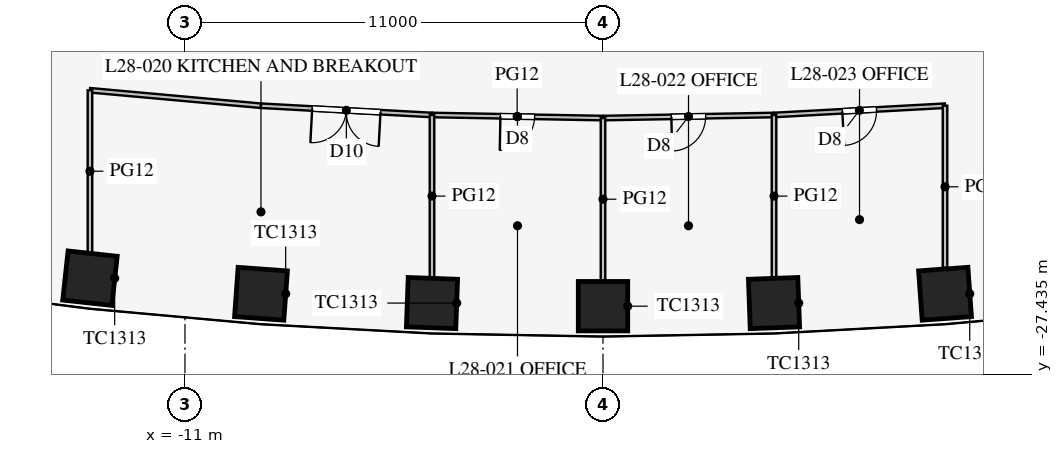
"""IFC4 building model, lengths in metres.
Left out: names, types, materials, properties, quantities, classifications, styles, units other than length and angle.
Written with IfcOpenShell. Run it as: python <this file> out.ifc"""

import sys

from ifc_helpers import new_model, si_unit, direction, frame, frame_2d, origin, origin_2d, place, context, subcontext, project, spatial, rectangle, extrude, element, fill, save


model = new_model("IFC4")
c1 = context("Model", 3, precision=1e-05, world=origin(), true_north=direction((0.0, 1.0)))
c2 = subcontext(c1, "Body", "Model", "MODEL_VIEW")
j1 = project(units=[si_unit("LENGTHUNIT", "METRE"), si_unit("PLANEANGLEUNIT", "RADIAN")], contexts=[c1])
p1 = place(None, origin())
s1 = spatial("IfcSite", under=j1, at=p1, CompositionType="ELEMENT")
p2 = place(p1, origin())
s2 = spatial("IfcBuilding", under=s1, at=p2, CompositionType="ELEMENT")
p3 = place(p2, frame((0.0, 0.0, 124.1)))
s3 = spatial("IfcBuildingStorey", under=s2, at=p3, CompositionType="ELEMENT", Elevation=124.1)
for number, where, z_axis, x_axis in (
    (1, (-13.5, -24.913, 0.0), (0.0, 0.0, 1.0), (0.994, -0.108, 0.0)),
    (2, (-9.0, -25.323, 0.0), (0.0, 0.0, 1.0), (0.997, -0.072, 0.0)),
    (3, (-4.5, -25.568, 0.0), (0.0, 0.0, 1.0), (0.999, -0.036, 0.0)),
    (4, (0.0, -25.65, 0.0), (0.0, 0.0, 1.0), (1.0, 0.0, 0.0)),
    (5, (4.5, -25.568, 0.0), (0.0, 0.0, 1.0), (0.999, 0.036, 0.0)),
    (6, (9.0, -25.323, 0.0), (0.0, 0.0, 1.0), (0.997, 0.072, 0.0)),
):
    element("IfcColumn", number, at=place(p3, frame(where, z_axis=z_axis, x_axis=x_axis)), inside=s3, PredefinedType="COLUMN", context=c2, shape_type="SweptSolid", body=[
        extrude(rectangle(XDim=1.3, YDim=1.3, at=origin_2d()), origin(), (0.0, 0.0, 1.0), 4.2),
    ])
p4 = place(p3, frame((0.0, -20.7, 0.0), z_axis=(0.0, 0.0, 1.0), x_axis=(0.999837820638, 0.018009231578, 0.0)))
e7 = element("IfcWall", 7, at=p4, inside=s3, PredefinedType="PARTITIONING", context=c2, shape_type="SweptSolid", body=[
    extrude(rectangle(XDim=4.501, YDim=0.12, at=frame_2d((2.25, 0.0))), origin(), (0.0, 0.0, 1.0), 2.9),
])
p5 = place(p4, frame((1.8, 0.0, 0.15)))
e8 = element("IfcOpeningElement", 8, at=p5, cuts=e7, PredefinedType="OPENING", context=c2, shape_type="SweptSolid", body=[
    extrude(rectangle(XDim=0.9, YDim=2.1, at=frame_2d((0.45, 1.05))), frame((0.0, 0.07, 0.0), z_axis=(0.0, -1.0, 0.0), x_axis=(1.0, 0.0, 0.0)), (0.0, 0.0, 1.0), 0.14),
])
p6 = place(p3, frame((4.5, -20.619, 0.0), z_axis=(0.0, 0.0, 1.0), x_axis=(0.998537376538, 0.054065771581, 0.0)))
e9 = element("IfcWall", 9, at=p6, inside=s3, PredefinedType="PARTITIONING", context=c2, shape_type="SweptSolid", body=[
    extrude(rectangle(XDim=4.507, YDim=0.12, at=frame_2d((2.253, 0.0))), origin(), (0.0, 0.0, 1.0), 2.9),
])
p7 = place(p6, frame((1.8, 0.0, 0.15)))
e10 = element("IfcOpeningElement", 10, at=p7, cuts=e9, PredefinedType="OPENING", context=c2, shape_type="SweptSolid", body=[
    extrude(rectangle(XDim=0.9, YDim=2.1, at=frame_2d((0.45, 1.05))), frame((0.0, 0.07, 0.0), z_axis=(0.0, -1.0, 0.0), x_axis=(1.0, 0.0, 0.0)), (0.0, 0.0, 1.0), 0.14),
])
p8 = place(p3, frame((-13.5, -19.968, 0.0), z_axis=(0.0, 0.0, 1.0), x_axis=(0.995930325215, -0.090126507295, 0.0)))
e11 = element("IfcWall", 11, at=p8, inside=s3, PredefinedType="PARTITIONING", context=c2, shape_type="SweptSolid", body=[
    extrude(rectangle(XDim=4.518, YDim=0.12, at=frame_2d((2.259, 0.0))), origin(), (0.0, 0.0, 1.0), 2.9),
])
p9 = place(p3, frame((-4.5, -20.619, 0.0), z_axis=(0.0, 0.0, 1.0), x_axis=(0.999837820638, -0.018009231578, 0.0)))
e12 = element("IfcWall", 12, at=p9, inside=s3, PredefinedType="PARTITIONING", context=c2, shape_type="SweptSolid", body=[
    extrude(rectangle(XDim=4.501, YDim=0.12, at=frame_2d((2.25, 0.0))), origin(), (0.0, 0.0, 1.0), 2.9),
])
p10 = place(p9, frame((1.8, 0.0, 0.15)))
e13 = element("IfcOpeningElement", 13, at=p10, cuts=e12, PredefinedType="OPENING", context=c2, shape_type="SweptSolid", body=[
    extrude(rectangle(XDim=0.9, YDim=2.1, at=frame_2d((0.45, 1.05))), frame((0.0, 0.07, 0.0), z_axis=(0.0, -1.0, 0.0), x_axis=(1.0, 0.0, 0.0)), (0.0, 0.0, 1.0), 0.14),
])
p11 = place(p3, frame((-9.0, -20.375, 0.0), z_axis=(0.0, 0.0, 1.0), x_axis=(0.998537376538, -0.054065771581, 0.0)))
e14 = element("IfcWall", 14, at=p11, inside=s3, PredefinedType="PARTITIONING", context=c2, shape_type="SweptSolid", body=[
    extrude(rectangle(XDim=4.507, YDim=0.12, at=frame_2d((2.253, 0.0))), origin(), (0.0, 0.0, 1.0), 2.9),
])
p12 = place(p11, frame((1.35, 0.0, 0.15)))
e15 = element("IfcOpeningElement", 15, at=p12, cuts=e14, PredefinedType="OPENING", context=c2, shape_type="SweptSolid", body=[
    extrude(rectangle(XDim=1.8, YDim=2.1, at=frame_2d((0.9, 1.05))), frame((0.0, 0.07, 0.0), z_axis=(0.0, -1.0, 0.0), x_axis=(1.0, 0.0, 0.0)), (0.0, 0.0, 1.0), 0.14),
])
p13 = place(p3, frame((0.0, -20.7, 0.0), z_axis=(0.0, 0.0, 1.0), x_axis=(0.0, -1.0, 0.0)))
e16 = element("IfcWall", 16, at=p13, inside=s3, PredefinedType="PARTITIONING", context=c2, shape_type="SweptSolid", body=[
    extrude(rectangle(XDim=4.27, YDim=0.12, at=frame_2d((2.135, 0.0))), origin(), (0.0, 0.0, 1.0), 2.9),
])
p14 = place(p3, frame((4.5, -20.619, 0.0), z_axis=(0.0, 0.0, 1.0), x_axis=(0.0, -1.0, 0.0)))
e17 = element("IfcWall", 17, at=p14, inside=s3, PredefinedType="PARTITIONING", context=c2, shape_type="SweptSolid", body=[
    extrude(rectangle(XDim=4.269, YDim=0.12, at=frame_2d((2.135, 0.0))), origin(), (0.0, 0.0, 1.0), 2.9),
])
p15 = place(p3, frame((9.0, -20.375, 0.0), z_axis=(0.0, 0.0, 1.0), x_axis=(0.0, -1.0, 0.0)))
e18 = element("IfcWall", 18, at=p15, inside=s3, PredefinedType="PARTITIONING", context=c2, shape_type="SweptSolid", body=[
    extrude(rectangle(XDim=4.266, YDim=0.12, at=frame_2d((2.133, 0.0))), origin(), (0.0, 0.0, 1.0), 2.9),
])
p16 = place(p3, frame((-13.5, -19.968, 0.0), z_axis=(0.0, 0.0, 1.0), x_axis=(0.0, -1.0, 0.0)))
e19 = element("IfcWall", 19, at=p16, inside=s3, PredefinedType="PARTITIONING", context=c2, shape_type="SweptSolid", body=[
    extrude(rectangle(XDim=4.261, YDim=0.12, at=frame_2d((2.131, 0.0))), origin(), (0.0, 0.0, 1.0), 2.9),
])
p17 = place(p3, frame((-4.5, -20.619, 0.0), z_axis=(0.0, 0.0, 1.0), x_axis=(0.0, -1.0, 0.0)))
e20 = element("IfcWall", 20, at=p17, inside=s3, PredefinedType="PARTITIONING", context=c2, shape_type="SweptSolid", body=[
    extrude(rectangle(XDim=4.269, YDim=0.12, at=frame_2d((2.135, 0.0))), origin(), (0.0, 0.0, 1.0), 2.9),
])
p18 = place(p12, frame((1.8, 0.0, 0.0), z_axis=(0.0, 0.0, 1.0), x_axis=(-1.0, 0.0, 0.0)))
e21 = element("IfcDoor", 21, at=p18, inside=s3, OperationType="DOUBLE_DOOR_SINGLE_SWING", PredefinedType="DOOR", context=c2, shape_type="SweptSolid", body=[
    extrude(rectangle(XDim=1.8, YDim=2.1, at=frame_2d((0.9, 1.05))), frame((0.0, 0.025, 0.0), z_axis=(0.0, -1.0, 0.0), x_axis=(1.0, 0.0, 0.0)), (0.0, 0.0, 1.0), 0.05),
])
fill(e15, e21)
p19 = place(p10, frame((0.9, 0.0, 0.0), z_axis=(0.0, 0.0, 1.0), x_axis=(-1.0, 0.0, 0.0)))
e22 = element("IfcDoor", 22, at=p19, inside=s3, OperationType="SINGLE_SWING_RIGHT", PredefinedType="DOOR", context=c2, shape_type="SweptSolid", body=[
    extrude(rectangle(XDim=0.9, YDim=2.1, at=frame_2d((0.45, 1.05))), frame((0.0, 0.025, 0.0), z_axis=(0.0, -1.0, 0.0), x_axis=(1.0, 0.0, 0.0)), (0.0, 0.0, 1.0), 0.05),
])
fill(e13, e22)
p20 = place(p5, frame((0.9, 0.0, 0.0), z_axis=(0.0, 0.0, 1.0), x_axis=(-1.0, 0.0, 0.0)))
e23 = element("IfcDoor", 23, at=p20, inside=s3, OperationType="SINGLE_SWING_RIGHT", PredefinedType="DOOR", context=c2, shape_type="SweptSolid", body=[
    extrude(rectangle(XDim=0.9, YDim=2.1, at=frame_2d((0.45, 1.05))), frame((0.0, 0.025, 0.0), z_axis=(0.0, -1.0, 0.0), x_axis=(1.0, 0.0, 0.0)), (0.0, 0.0, 1.0), 0.05),
])
fill(e8, e23)
p21 = place(p7, frame((0.9, 0.0, 0.0), z_axis=(0.0, 0.0, 1.0), x_axis=(-1.0, 0.0, 0.0)))
e24 = element("IfcDoor", 24, at=p21, inside=s3, OperationType="SINGLE_SWING_RIGHT", PredefinedType="DOOR", context=c2, shape_type="SweptSolid", body=[
    extrude(rectangle(XDim=0.9, YDim=2.1, at=frame_2d((0.45, 1.05))), frame((0.0, 0.025, 0.0), z_axis=(0.0, -1.0, 0.0), x_axis=(1.0, 0.0, 0.0)), (0.0, 0.0, 1.0), 0.05),
])
fill(e10, e24)
save(model, sys.argv[1])
